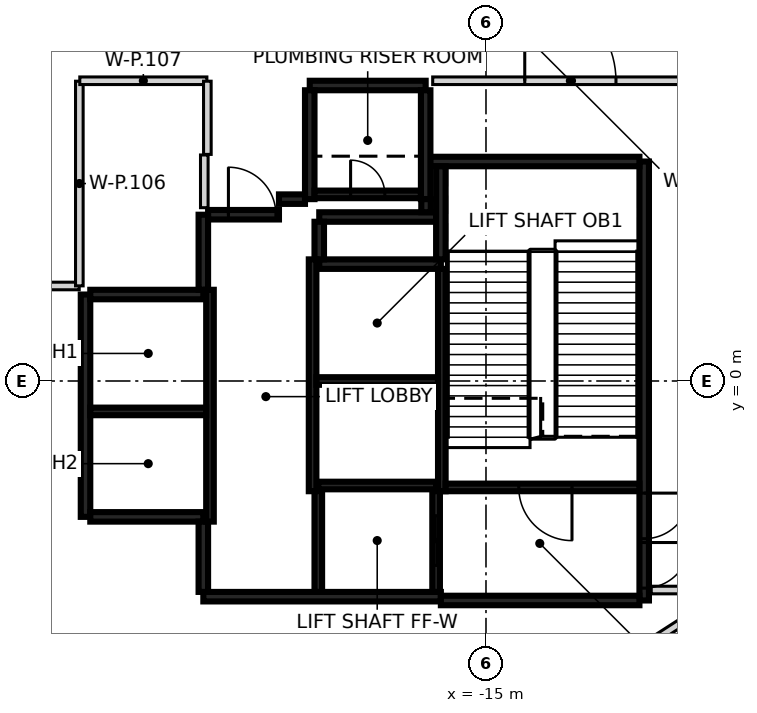
"""IFC4 building model, lengths in metres.
Left out: names, types, materials, properties, quantities, classifications, styles, units other than length and angle.
Written with IfcOpenShell. Run it as: python <this file> out.ifc"""

import sys

from ifc_helpers import new_model, si_unit, direction, frame, frame_2d, origin, place, context, subcontext, project, spatial, rectangle, extrude, element, fill, save


model = new_model("IFC4")
c1 = context("Model", 3, precision=1e-05, world=origin(), true_north=direction((0.0, 1.0)))
c2 = subcontext(c1, "Body", "Model", "MODEL_VIEW")
j1 = project(units=[si_unit("LENGTHUNIT", "METRE"), si_unit("PLANEANGLEUNIT", "RADIAN")], contexts=[c1])
p1 = place(None, origin())
s1 = spatial("IfcSite", under=j1, at=p1, CompositionType="ELEMENT")
p2 = place(p1, origin())
s2 = spatial("IfcBuilding", under=s1, at=p2, CompositionType="ELEMENT")
p3 = place(p2, frame((0.0, 0.0, 14.0)))
s3 = spatial("IfcBuildingStorey", under=s2, at=p3, CompositionType="ELEMENT", Elevation=14.0)
p4 = place(p3, frame((-10.837, 5.775, 0.0), z_axis=(0.0, 0.0, 1.0), x_axis=(0.0, -1.0, 0.0)))
e1 = element("IfcWall", 1, at=p4, inside=s3, PredefinedType="SHEAR", context=c2, shape_type="SweptSolid", body=[
    extrude(rectangle(XDim=11.55, YDim=0.25, at=frame_2d((5.775, 0.0))), origin(), (0.0, 0.0, 1.0), 5.15),
])
p5 = place(p4, frame((10.025, 0.0, 0.0)))
e2 = element("IfcOpeningElement", 2, at=p5, cuts=e1, PredefinedType="OPENING", context=c2, shape_type="SweptSolid", body=[
    extrude(rectangle(XDim=1.2, YDim=2.1, at=frame_2d((0.6, 1.05))), frame((0.0, 0.135, 0.0), z_axis=(0.0, -1.0, 0.0), x_axis=(1.0, 0.0, 0.0)), (0.0, 0.0, 1.0), 0.27),
])
p6 = place(p4, frame((8.725, 0.0, 0.0)))
e3 = element("IfcOpeningElement", 3, at=p6, cuts=e1, PredefinedType="OPENING", context=c2, shape_type="SweptSolid", body=[
    extrude(rectangle(XDim=1.2, YDim=2.1, at=frame_2d((0.6, 1.05))), frame((0.0, 0.135, 0.0), z_axis=(0.0, -1.0, 0.0), x_axis=(1.0, 0.0, 0.0)), (0.0, 0.0, 1.0), 0.27),
])
p7 = place(p3, frame((-16.187, -5.675, 0.0), z_axis=(0.0, 0.0, 1.0), x_axis=(-1.0, 0.0, 0.0)))
e4 = element("IfcWall", 4, at=p7, inside=s3, PredefinedType="SHEAR", context=c2, shape_type="SweptSolid", body=[
    extrude(rectangle(XDim=6.25, YDim=0.25, at=frame_2d((3.125, 0.0))), origin(), (0.0, 0.0, 1.0), 5.15),
])
p8 = place(p3, frame((-25.537, -3.575, 0.0), z_axis=(0.0, 0.0, 1.0), x_axis=(0.0, 1.0, 0.0)))
e5 = element("IfcWall", 5, at=p8, inside=s3, PredefinedType="SHEAR", context=c2, shape_type="SweptSolid", body=[
    extrude(rectangle(XDim=5.85, YDim=0.25, at=frame_2d((2.925, 0.0))), origin(), (0.0, 0.0, 1.0), 5.15),
])
p9 = place(p3, frame((-10.963, -5.775, 0.0), z_axis=(0.0, 0.0, 1.0), x_axis=(-1.0, 0.0, 0.0)))
e6 = element("IfcWall", 6, at=p9, inside=s3, PredefinedType="SHEAR", context=c2, shape_type="SweptSolid", body=[
    extrude(rectangle(XDim=5.225, YDim=0.25, at=frame_2d((2.612, 0.0))), origin(), (0.0, 0.0, 1.0), 5.15),
])
p10 = place(p3, frame((-16.472, 5.775, 0.0), z_axis=(0.0, 0.0, 1.0), x_axis=(1.0, 0.0, 0.0)))
e7 = element("IfcWall", 7, at=p10, inside=s3, PredefinedType="SHEAR", context=c2, shape_type="SweptSolid", body=[
    extrude(rectangle(XDim=5.51, YDim=0.25, at=frame_2d((2.755, 0.0))), origin(), (0.0, 0.0, 1.0), 5.15),
])
p11 = place(p3, frame((-19.387, 3.075, 0.0), z_axis=(0.0, 0.0, 1.0), x_axis=(1.0, 0.0, 0.0)))
e8 = element("IfcWall", 8, at=p11, inside=s3, PredefinedType="SHEAR", context=c2, shape_type="SweptSolid", body=[
    extrude(rectangle(XDim=3.2, YDim=0.25, at=frame_2d((1.6, 0.0))), origin(), (0.0, 0.0, 1.0), 5.15),
])
for number, where, z_axis, x_axis in (
    (9, (-22.437, -3.575, 0.0), (0.0, 0.0, 1.0), (-1.0, 0.0, 0.0)),
    (10, (-25.412, 2.275, 0.0), (0.0, 0.0, 1.0), (1.0, 0.0, 0.0)),
):
    element("IfcWall", number, at=place(p3, frame(where, z_axis=z_axis, x_axis=x_axis)), inside=s3, PredefinedType="SHEAR", context=c2, shape_type="SweptSolid", body=[
        extrude(rectangle(XDim=2.975, YDim=0.25, at=frame_2d((1.487, 0.0))), origin(), (0.0, 0.0, 1.0), 5.15),
    ])
p12 = place(p3, frame((-19.637, 7.775, 0.0), z_axis=(0.0, 0.0, 1.0), x_axis=(1.0, 0.0, 0.0)))
e11 = element("IfcWall", 11, at=p12, inside=s3, PredefinedType="SHEAR", context=c2, shape_type="SweptSolid", body=[
    extrude(rectangle(XDim=3.05, YDim=0.25, at=frame_2d((1.525, 0.0))), origin(), (0.0, 0.0, 1.0), 5.15),
])
for number, where, z_axis, x_axis in (
    (12, (-16.587, 7.65, 0.0), (0.0, 0.0, 1.0), (0.0, -1.0, 0.0)),
    (13, (-19.637, 4.785, 0.0), (0.0, 0.0, 1.0), (0.0, 1.0, 0.0)),
):
    element("IfcWall", number, at=place(p3, frame(where, z_axis=z_axis, x_axis=x_axis)), inside=s3, PredefinedType="SHEAR", context=c2, shape_type="SweptSolid", body=[
        extrude(rectangle(XDim=2.865, YDim=0.25, at=frame_2d((1.432, 0.0))), origin(), (0.0, 0.0, 1.0), 5.15),
    ])
p13 = place(p3, frame((-16.302, 4.315, 0.0), z_axis=(0.0, 0.0, 1.0), x_axis=(-1.0, 0.0, 0.0)))
e14 = element("IfcWall", 14, at=p13, inside=s3, PredefinedType="SHEAR", context=c2, shape_type="SweptSolid", body=[
    extrude(rectangle(XDim=3.085, YDim=0.25, at=frame_2d((1.542, 0.0))), origin(), (0.0, 0.0, 1.0), 5.15),
])
p14 = place(p3, frame((-16.187, 3.2, 0.0), z_axis=(0.0, 0.0, 1.0), x_axis=(0.0, 1.0, 0.0)))
e15 = element("IfcWall", 15, at=p14, inside=s3, PredefinedType="SHEAR", context=c2, shape_type="SweptSolid", body=[
    extrude(rectangle(XDim=2.449, YDim=0.25, at=frame_2d((1.225, 0.0))), origin(), (0.0, 0.0, 1.0), 5.15),
])
p15 = place(p3, frame((-22.437, 2.4, 0.0), z_axis=(0.0, 0.0, 1.0), x_axis=(0.0, 1.0, 0.0)))
e16 = element("IfcWall", 16, at=p15, inside=s3, PredefinedType="SHEAR", context=c2, shape_type="SweptSolid", body=[
    extrude(rectangle(XDim=1.975, YDim=0.25, at=frame_2d((0.987, 0.0))), origin(), (0.0, 0.0, 1.0), 5.15),
])
p16 = place(p3, frame((-22.437, -5.55, 0.0), z_axis=(0.0, 0.0, 1.0), x_axis=(0.0, 1.0, 0.0)))
e17 = element("IfcWall", 17, at=p16, inside=s3, PredefinedType="SHEAR", context=c2, shape_type="SweptSolid", body=[
    extrude(rectangle(XDim=1.849, YDim=0.25, at=frame_2d((0.925, 0.0))), origin(), (0.0, 0.0, 1.0), 5.15),
])
p17 = place(p3, frame((-22.312, 4.375, 0.0), z_axis=(0.0, 0.0, 1.0), x_axis=(1.0, 0.0, 0.0)))
e18 = element("IfcWall", 18, at=p17, inside=s3, PredefinedType="SHEAR", context=c2, shape_type="SweptSolid", body=[
    extrude(rectangle(XDim=1.865, YDim=0.25, at=frame_2d((0.932, 0.0))), origin(), (0.0, 0.0, 1.0), 5.15),
])
p18 = place(p17, frame((0.535, 0.0, 0.0)))
e19 = element("IfcOpeningElement", 19, at=p18, cuts=e18, PredefinedType="OPENING", context=c2, shape_type="SweptSolid", body=[
    extrude(rectangle(XDim=1.25, YDim=2.1, at=frame_2d((0.625, 1.05))), frame((0.0, 0.135, 0.0), z_axis=(0.0, -1.0, 0.0), x_axis=(1.0, 0.0, 0.0)), (0.0, 0.0, 1.0), 0.27),
])
p19 = place(p3, frame((-19.387, 4.19, 0.0), z_axis=(0.0, 0.0, 1.0), x_axis=(0.0, -1.0, 0.0)))
e20 = element("IfcWall", 20, at=p19, inside=s3, PredefinedType="SHEAR", context=c2, shape_type="SweptSolid", body=[
    extrude(rectangle(XDim=0.989, YDim=0.25, at=frame_2d((0.495, 0.0))), origin(), (0.0, 0.0, 1.0), 5.15),
])
p20 = place(p3, frame((-20.447, 4.785, 0.0), z_axis=(0.0, 0.0, 1.0), x_axis=(1.0, 0.0, 0.0)))
e21 = element("IfcWall", 21, at=p20, inside=s3, PredefinedType="SHEAR", context=c2, shape_type="SweptSolid", body=[
    extrude(rectangle(XDim=0.685, YDim=0.25, at=frame_2d((0.342, 0.0))), origin(), (0.0, 0.0, 1.0), 5.15),
])
p21 = place(p3, frame((-16.577, 4.785, 0.0), z_axis=(0.0, 0.0, 1.0), x_axis=(0.0, -1.0, 0.0)))
e22 = element("IfcWall", 22, at=p21, inside=s3, PredefinedType="SHEAR", context=c2, shape_type="SweptSolid", body=[
    extrude(rectangle(XDim=0.344, YDim=0.25, at=frame_2d((0.172, 0.0))), origin(), (0.0, 0.0, 1.0), 5.15),
])
p22 = place(p3, frame((-16.162, 2.951, 0.0), z_axis=(0.0, 0.0, 1.0), x_axis=(0.0, -1.0, 0.0)))
e23 = element("IfcWall", 23, at=p22, inside=s3, PredefinedType="SHEAR", context=c2, shape_type="SweptSolid", body=[
    extrude(rectangle(XDim=5.851, YDim=0.2, at=frame_2d((2.925, 0.0))), origin(), (0.0, 0.0, 1.0), 5.15),
])
for number, where, z_axis, x_axis in (
    (24, (-19.562, -2.9, 0.0), (0.0, 0.0, 1.0), (0.0, 1.0, 0.0)),
    (25, (-22.262, 2.4, 0.0), (0.0, 0.0, 1.0), (0.0, -1.0, 0.0)),
):
    element("IfcWall", number, at=place(p3, frame(where, z_axis=z_axis, x_axis=x_axis)), inside=s3, PredefinedType="SHEAR", context=c2, shape_type="SweptSolid", body=[
        extrude(rectangle(XDim=6.1, YDim=0.2, at=frame_2d((3.05, 0.0))), origin(), (0.0, 0.0, 1.0), 5.15),
    ])
p23 = place(p3, frame((-10.963, -2.8, 0.0), z_axis=(0.0, 0.0, 1.0), x_axis=(-1.0, 0.0, 0.0)))
e26 = element("IfcWall", 26, at=p23, inside=s3, PredefinedType="SHEAR", context=c2, shape_type="SweptSolid", body=[
    extrude(rectangle(XDim=5.098, YDim=0.2, at=frame_2d((2.549, 0.0))), origin(), (0.0, 0.0, 1.0), 5.15),
])
p24 = place(p23, frame((1.774, 0.0, 0.0)))
e27 = element("IfcOpeningElement", 27, at=p24, cuts=e26, PredefinedType="OPENING", context=c2, shape_type="SweptSolid", body=[
    extrude(rectangle(XDim=1.4, YDim=2.1, at=frame_2d((0.7, 1.05))), frame((0.0, 0.11, 0.0), z_axis=(0.0, -1.0, 0.0), x_axis=(1.0, 0.0, 0.0)), (0.0, 0.0, 1.0), 0.22),
])
p25 = place(p3, frame((-16.263, 0.0, 0.0), z_axis=(0.0, 0.0, 1.0), x_axis=(-1.0, 0.0, 0.0)))
e28 = element("IfcWall", 28, at=p25, inside=s3, PredefinedType="SHEAR", context=c2, shape_type="SweptSolid", body=[
    extrude(rectangle(XDim=3.198, YDim=0.2, at=frame_2d((1.599, 0.0))), origin(), (0.0, 0.0, 1.0), 5.15),
])
p26 = place(p3, frame((-22.363, -0.8, 0.0), z_axis=(0.0, 0.0, 1.0), x_axis=(-1.0, 0.0, 0.0)))
e29 = element("IfcWall", 29, at=p26, inside=s3, PredefinedType="SHEAR", context=c2, shape_type="SweptSolid", body=[
    extrude(rectangle(XDim=3.048, YDim=0.2, at=frame_2d((1.524, 0.0))), origin(), (0.0, 0.0, 1.0), 5.15),
])
p27 = place(p3, frame((-19.511, 4.91, 0.0), z_axis=(0.0, 0.0, 1.0), x_axis=(1.0, 0.0, 0.0)))
e30 = element("IfcWall", 30, at=p27, inside=s3, PredefinedType="SHEAR", context=c2, shape_type="SweptSolid", body=[
    extrude(rectangle(XDim=2.798, YDim=0.2, at=frame_2d((1.399, 0.0))), origin(), (0.0, 0.0, 1.0), 5.15),
])
p28 = place(p27, frame((0.949, 0.0, 0.0)))
e31 = element("IfcOpeningElement", 31, at=p28, cuts=e30, PredefinedType="OPENING", context=c2, shape_type="SweptSolid", body=[
    extrude(rectangle(XDim=0.9, YDim=2.1, at=frame_2d((0.45, 1.05))), frame((0.0, 0.11, 0.0), z_axis=(0.0, -1.0, 0.0), x_axis=(1.0, 0.0, 0.0)), (0.0, 0.0, 1.0), 0.22),
])
p29 = place(p3, frame((-19.412, -2.75, 0.0), z_axis=(0.0, 0.0, 1.0), x_axis=(1.0, 0.0, 0.0)))
e32 = element("IfcWall", 32, at=p29, inside=s3, PredefinedType="SHEAR", context=c2, shape_type="SweptSolid", body=[
    extrude(rectangle(XDim=3.1, YDim=0.2, at=frame_2d((1.55, 0.0))), origin(), (0.0, 0.0, 1.0), 5.15),
])
p30 = place(p3, frame((-16.312, -2.898, 0.0), z_axis=(0.0, 0.0, 1.0), x_axis=(0.0, -1.0, 0.0)))
e33 = element("IfcWall", 33, at=p30, inside=s3, PredefinedType="SHEAR", context=c2, shape_type="SweptSolid", body=[
    extrude(rectangle(XDim=2.651, YDim=0.2, at=frame_2d((1.325, 0.0))), origin(), (0.0, 0.0, 1.0), 5.15),
])
p31 = place(p30, frame((0.652, 0.0, 0.0)))
e34 = element("IfcOpeningElement", 34, at=p31, cuts=e33, PredefinedType="OPENING", context=c2, shape_type="SweptSolid", body=[
    extrude(rectangle(XDim=1.3, YDim=2.1, at=frame_2d((0.65, 1.05))), frame((0.0, 0.11, 0.0), z_axis=(0.0, -1.0, 0.0), x_axis=(1.0, 0.0, 0.0)), (0.0, 0.0, 1.0), 0.22),
])
p32 = place(p3, frame((-19.412, -5.549, 0.0), z_axis=(0.0, 0.0, 1.0), x_axis=(0.0, 1.0, 0.0)))
e35 = element("IfcWall", 35, at=p32, inside=s3, PredefinedType="SHEAR", context=c2, shape_type="SweptSolid", body=[
    extrude(rectangle(XDim=2.651, YDim=0.2, at=frame_2d((1.325, 0.0))), origin(), (0.0, 0.0, 1.0), 5.15),
])
p33 = place(p3, frame((-16.402, 7.9, 0.0), z_axis=(0.0, 0.0, 1.0), x_axis=(1.0, 0.0, 0.0)))
e36 = element("IfcWall", 36, at=p33, inside=s3, PredefinedType="PARTITIONING", context=c2, shape_type="SweptSolid", body=[
    extrude(rectangle(XDim=7.304, YDim=0.2, at=frame_2d((3.652, 0.0))), origin(), (0.0, 0.0, 1.0), 5.15),
])
p34 = place(p33, frame((2.422, 0.0, 0.0)))
e37 = element("IfcOpeningElement", 37, at=p34, cuts=e36, PredefinedType="OPENING", context=c2, shape_type="SweptSolid", body=[
    extrude(rectangle(XDim=2.4, YDim=2.1, at=frame_2d((1.2, 1.05))), frame((0.0, 0.11, 0.0), z_axis=(0.0, -1.0, 0.0), x_axis=(1.0, 0.0, 0.0)), (0.0, 0.0, 1.0), 0.22),
])
p35 = place(p3, frame((-10.652, -5.5, 0.0), z_axis=(0.0, 0.0, 1.0), x_axis=(1.0, 0.0, 0.0)))
e38 = element("IfcWall", 38, at=p35, inside=s3, PredefinedType="PARTITIONING", context=c2, shape_type="SweptSolid", body=[
    extrude(rectangle(XDim=1.989, YDim=0.2, at=frame_2d((0.995, 0.0))), origin(), (0.0, 0.0, 1.0), 5.15),
])
p36 = place(p3, frame((-38.995, 2.5, 0.0), z_axis=(0.0, 0.0, 1.0), x_axis=(1.0, 0.0, 0.0)))
e39 = element("IfcWall", 39, at=p36, inside=s3, PredefinedType="PARTITIONING", context=c2, shape_type="SweptSolid", body=[
    extrude(rectangle(XDim=13.292, YDim=0.2, at=frame_2d((6.646, 0.0))), origin(), (0.0, 0.0, 1.0), 5.15),
])
p37 = place(p36, frame((6.146, 0.0, 0.0)))
e40 = element("IfcOpeningElement", 40, at=p37, cuts=e39, PredefinedType="OPENING", context=c2, shape_type="SweptSolid", body=[
    extrude(rectangle(XDim=1.0, YDim=2.1, at=frame_2d((0.5, 1.05))), frame((0.0, 0.11, 0.0), z_axis=(0.0, -1.0, 0.0), x_axis=(1.0, 0.0, 0.0)), (0.0, 0.0, 1.0), 0.22),
])
p38 = place(p3, frame((-25.7, 2.503, 0.0), z_axis=(0.0, 0.0, 1.0), x_axis=(0.0, 1.0, 0.0)))
e41 = element("IfcWall", 41, at=p38, inside=s3, PredefinedType="PARTITIONING", context=c2, shape_type="SweptSolid", body=[
    extrude(rectangle(XDim=5.385, YDim=0.2, at=frame_2d((2.692, 0.0))), origin(), (0.0, 0.0, 1.0), 5.15),
])
p39 = place(p3, frame((-25.688, 7.9, 0.0), z_axis=(0.0, 0.0, 1.0), x_axis=(1.0, 0.0, 0.0)))
e42 = element("IfcWall", 42, at=p39, inside=s3, PredefinedType="PARTITIONING", context=c2, shape_type="SweptSolid", body=[
    extrude(rectangle(XDim=3.344, YDim=0.2, at=frame_2d((1.672, 0.0))), origin(), (0.0, 0.0, 1.0), 5.15),
])
p40 = place(p3, frame((-25.509, -16.444, 0.0), z_axis=(0.0, 0.0, 1.0), x_axis=(0.840504011594, 0.541805321582, 0.0)))
e43 = element("IfcWall", 43, at=p40, inside=s3, PredefinedType="PARTITIONING", context=c2, shape_type="SweptSolid", body=[
    extrude(rectangle(XDim=20.79, YDim=0.2, at=frame_2d((10.395, 0.0))), origin(), (0.0, 0.0, 1.0), 2.75),
])
p41 = place(p3, frame((-22.412, 4.56, 0.0), z_axis=(0.0, 0.0, 1.0), x_axis=(0.0, 1.0, 0.0)))
e44 = element("IfcWall", 44, at=p41, inside=s3, PredefinedType="PARTITIONING", context=c2, shape_type="SweptSolid", body=[
    extrude(rectangle(XDim=1.387, YDim=0.2, at=frame_2d((0.693, 0.0))), origin(), (0.0, 0.0, 1.0), 5.15),
])
p42 = place(p3, frame((-22.332, 7.888, 0.0), z_axis=(0.0, 0.0, 1.0), x_axis=(0.000507035047, -0.999999871458, 0.0)))
e45 = element("IfcWall", 45, at=p42, inside=s3, PredefinedType="PARTITIONING", context=c2, shape_type="SweptSolid", body=[
    extrude(rectangle(XDim=1.926, YDim=0.2, at=frame_2d((0.963, 0.0))), origin(), (0.0, 0.0, 1.0), 5.15),
])
p43 = place(p31, origin())
e46 = element("IfcDoor", 46, at=p43, inside=s3, OperationType="SLIDING_TO_LEFT", PredefinedType="DOOR", context=c2, shape_type="SweptSolid", body=[
    extrude(rectangle(XDim=1.3, YDim=2.1, at=frame_2d((0.65, 1.05))), frame((0.0, 0.025, 0.0), z_axis=(0.0, -1.0, 0.0), x_axis=(1.0, 0.0, 0.0)), (0.0, 0.0, 1.0), 0.05),
])
fill(e34, e46)
p44 = place(p18, origin())
e47 = element("IfcDoor", 47, at=p44, inside=s3, OperationType="SINGLE_SWING_LEFT", PredefinedType="DOOR", context=c2, shape_type="SweptSolid", body=[
    extrude(rectangle(XDim=1.25, YDim=2.1, at=frame_2d((0.625, 1.05))), frame((0.0, 0.025, 0.0), z_axis=(0.0, -1.0, 0.0), x_axis=(1.0, 0.0, 0.0)), (0.0, 0.0, 1.0), 0.05),
])
fill(e19, e47)
p45 = place(p5, origin())
e48 = element("IfcDoor", 48, at=p45, inside=s3, OperationType="SINGLE_SWING_LEFT", PredefinedType="DOOR", context=c2, shape_type="SweptSolid", body=[
    extrude(rectangle(XDim=1.2, YDim=2.1, at=frame_2d((0.6, 1.05))), frame((0.0, 0.025, 0.0), z_axis=(0.0, -1.0, 0.0), x_axis=(1.0, 0.0, 0.0)), (0.0, 0.0, 1.0), 0.05),
])
fill(e2, e48)
p46 = place(p6, origin())
e49 = element("IfcDoor", 49, at=p46, inside=s3, OperationType="SINGLE_SWING_RIGHT", PredefinedType="DOOR", context=c2, shape_type="SweptSolid", body=[
    extrude(rectangle(XDim=1.2, YDim=2.1, at=frame_2d((0.6, 1.05))), frame((0.0, 0.025, 0.0), z_axis=(0.0, -1.0, 0.0), x_axis=(1.0, 0.0, 0.0)), (0.0, 0.0, 1.0), 0.05),
])
fill(e3, e49)
p47 = place(p24, origin())
e50 = element("IfcDoor", 50, at=p47, inside=s3, OperationType="SINGLE_SWING_LEFT", PredefinedType="DOOR", context=c2, shape_type="SweptSolid", body=[
    extrude(rectangle(XDim=1.4, YDim=2.1, at=frame_2d((0.7, 1.05))), frame((0.0, 0.025, 0.0), z_axis=(0.0, -1.0, 0.0), x_axis=(1.0, 0.0, 0.0)), (0.0, 0.0, 1.0), 0.05),
])
fill(e27, e50)
p48 = place(p28, origin())
e51 = element("IfcDoor", 51, at=p48, inside=s3, OperationType="SINGLE_SWING_RIGHT", PredefinedType="DOOR", context=c2, shape_type="SweptSolid", body=[
    extrude(rectangle(XDim=0.9, YDim=2.1, at=frame_2d((0.45, 1.05))), frame((0.0, 0.025, 0.0), z_axis=(0.0, -1.0, 0.0), x_axis=(1.0, 0.0, 0.0)), (0.0, 0.0, 1.0), 0.05),
])
fill(e31, e51)
p49 = place(p34, frame((2.4, 0.0, 0.0), z_axis=(0.0, 0.0, 1.0), x_axis=(-1.0, 0.0, 0.0)))
e52 = element("IfcDoor", 52, at=p49, inside=s3, OperationType="DOUBLE_DOOR_SINGLE_SWING", PredefinedType="DOOR", context=c2, shape_type="SweptSolid", body=[
    extrude(rectangle(XDim=2.4, YDim=2.1, at=frame_2d((1.2, 1.05))), frame((0.0, 0.025, 0.0), z_axis=(0.0, -1.0, 0.0), x_axis=(1.0, 0.0, 0.0)), (0.0, 0.0, 1.0), 0.05),
])
fill(e37, e52)
save(model, sys.argv[1])
